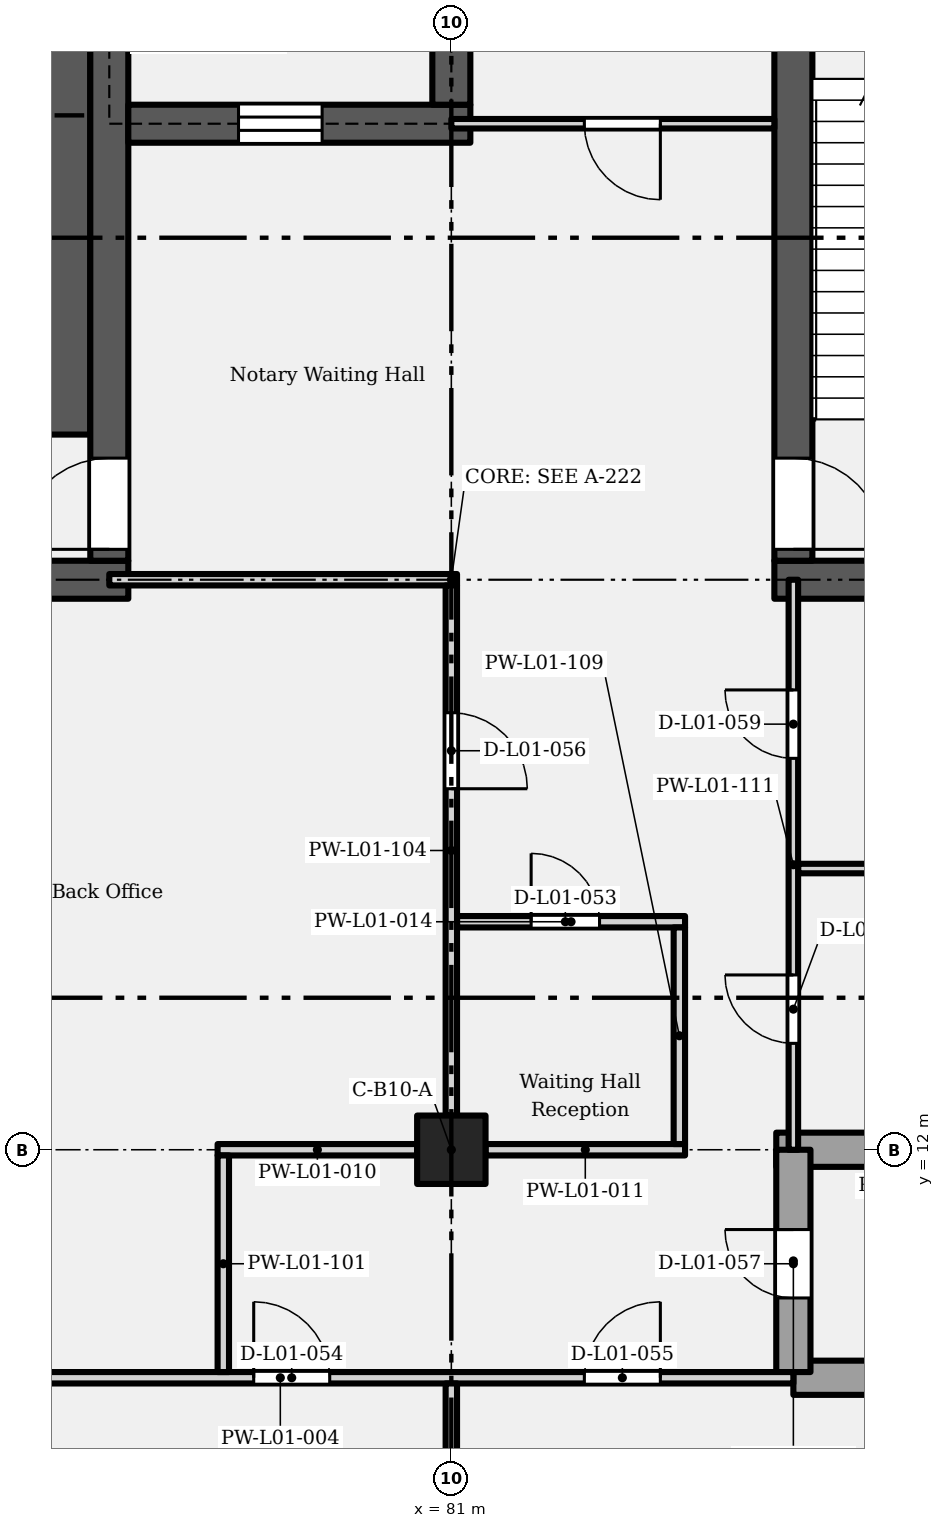
"""IFC4 building model, lengths in metres.
Left out: names, types, materials, properties, quantities, classifications, styles, units other than length and angle.
Written with IfcOpenShell. Run it as: python <this file> out.ifc"""

import sys

from ifc_helpers import new_model, si_unit, direction, frame, frame_2d, origin, origin_2d, place, context, subcontext, project, spatial, rectangle, extrude, element, fill, save


model = new_model("IFC4")
c1 = context("Model", 3, precision=1e-05, world=origin(), true_north=direction((0.0, 1.0)))
c2 = subcontext(c1, "Body", "Model", "MODEL_VIEW")
j1 = project(units=[si_unit("LENGTHUNIT", "METRE"), si_unit("PLANEANGLEUNIT", "RADIAN")], contexts=[c1])
p1 = place(None, origin())
s1 = spatial("IfcSite", under=j1, at=p1, CompositionType="ELEMENT")
p2 = place(p1, origin())
s2 = spatial("IfcBuilding", under=s1, at=p2, CompositionType="ELEMENT")
p3 = place(p2, frame((0.0, 0.0, 6.6)))
s3 = spatial("IfcBuildingStorey", under=s2, at=p3, CompositionType="ELEMENT", Elevation=6.6)
p4 = place(p3, frame((81.0, 12.0, 0.0), z_axis=(0.0, 0.0, 1.0), x_axis=(1.0, 0.0, 0.0)))
e1 = element("IfcColumn", 1, at=p4, inside=s3, PredefinedType="COLUMN", context=c2, shape_type="SweptSolid", body=[
    extrude(rectangle(XDim=0.9, YDim=0.9, at=origin_2d()), origin(), (0.0, 0.0, 1.0), 5.202),
])
for number, where, z_axis, x_axis in (
    (2, (71.75, 19.5, 0.0), (0.0, 0.0, 1.0), (1.0, 0.0, 0.0)),
    (3, (85.25, 19.5, 0.0), (0.0, 0.0, 1.0), (1.0, 0.0, 0.0)),
):
    element("IfcWall", number, at=place(p3, frame(where, z_axis=z_axis, x_axis=x_axis)), inside=s3, PredefinedType="SHEAR", context=c2, shape_type="SweptSolid", body=[
        extrude(rectangle(XDim=5.0, YDim=0.5, at=frame_2d((2.5, 0.0))), origin(), (0.0, 0.0, 1.0), 4.952),
    ])
p5 = place(p3, frame((76.5, 19.75, 0.0), z_axis=(0.0, 0.0, 1.0), x_axis=(0.0, 1.0, 0.0)))
e4 = element("IfcWall", 4, at=p5, inside=s3, PredefinedType="SHEAR", context=c2, shape_type="SweptSolid", body=[
    extrude(rectangle(XDim=8.5, YDim=0.5, at=frame_2d((4.25, 0.0))), origin(), (0.0, 0.0, 1.0), 4.952),
])
p6 = place(p5, frame((0.15, 0.0, 0.0)))
e5 = element("IfcOpeningElement", 5, at=p6, cuts=e4, PredefinedType="OPENING", context=c2, shape_type="SweptSolid", body=[
    extrude(rectangle(XDim=1.2, YDim=2.1, at=frame_2d((0.6, 1.05))), frame((0.0, 0.26, 0.0), z_axis=(0.0, -1.0, 0.0), x_axis=(1.0, 0.0, 0.0)), (0.0, 0.0, 1.0), 0.52),
])
p7 = place(p3, frame((85.5, 19.75, 0.0), z_axis=(0.0, 0.0, 1.0), x_axis=(0.0, 1.0, 0.0)))
e6 = element("IfcWall", 6, at=p7, inside=s3, PredefinedType="SHEAR", context=c2, shape_type="SweptSolid", body=[
    extrude(rectangle(XDim=8.5, YDim=0.5, at=frame_2d((4.25, 0.0))), origin(), (0.0, 0.0, 1.0), 4.952),
])
p8 = place(p7, frame((1.35, 0.0, 0.0), z_axis=(0.0, 0.0, 1.0), x_axis=(-1.0, 0.0, 0.0)))
e7 = element("IfcOpeningElement", 7, at=p8, cuts=e6, PredefinedType="OPENING", context=c2, shape_type="SweptSolid", body=[
    extrude(rectangle(XDim=1.2, YDim=2.1, at=frame_2d((0.6, 1.05))), frame((0.0, 0.26, 0.0), z_axis=(0.0, -1.0, 0.0), x_axis=(1.0, 0.0, 0.0)), (0.0, 0.0, 1.0), 0.52),
])
p9 = place(p3, frame((76.75, 25.5, 0.0), z_axis=(0.0, 0.0, 1.0), x_axis=(1.0, 0.0, 0.0)))
e8 = element("IfcWall", 8, at=p9, inside=s3, PredefinedType="SHEAR", context=c2, shape_type="SweptSolid", body=[
    extrude(rectangle(XDim=4.5, YDim=0.5, at=frame_2d((2.25, 0.0))), origin(), (0.0, 0.0, 1.0), 4.952),
])
p10 = place(p9, frame((1.45, 0.0, 0.0)))
e9 = element("IfcOpeningElement", 9, at=p10, cuts=e8, PredefinedType="OPENING", context=c2, shape_type="SweptSolid", body=[
    extrude(rectangle(XDim=1.1, YDim=2.1, at=frame_2d((0.55, 1.05))), frame((0.0, 0.26, 0.0), z_axis=(0.0, -1.0, 0.0), x_axis=(1.0, 0.0, 0.0)), (0.0, 0.0, 1.0), 0.52),
])
p11 = place(p3, frame((81.0, 25.75, 0.0), z_axis=(0.0, 0.0, 1.0), x_axis=(0.0, 1.0, 0.0)))
e10 = element("IfcWall", 10, at=p11, inside=s3, PredefinedType="SHEAR", context=c2, shape_type="SweptSolid", body=[
    extrude(rectangle(XDim=2.3, YDim=0.5, at=frame_2d((1.15, 0.0))), origin(), (0.0, 0.0, 1.0), 4.952),
])
p12 = place(p3, frame((76.36, 25.5, 5.202), z_axis=(0.0, 0.0, 1.0), x_axis=(1.0, 0.0, 0.0)))
e11 = element("IfcWall", 11, at=p12, inside=s3, PredefinedType="SOLIDWALL", context=c2, shape_type="SweptSolid", body=[
    extrude(rectangle(XDim=4.78, YDim=0.28, at=frame_2d((2.39, 0.0))), origin(), (0.0, 0.0, 1.0), 3.1),
])
p13 = place(p12, frame((1.84, 0.0, 0.198)))
e12 = element("IfcOpeningElement", 12, at=p13, cuts=e11, PredefinedType="OPENING", context=c2, shape_type="SweptSolid", body=[
    extrude(rectangle(XDim=1.1, YDim=2.1, at=frame_2d((0.55, 1.05))), frame((0.0, 0.15, 0.0), z_axis=(0.0, -1.0, 0.0), x_axis=(1.0, 0.0, 0.0)), (0.0, 0.0, 1.0), 0.3),
])
for number, where, z_axis, x_axis in (
    (13, (76.5, 25.64, 5.202), (0.0, 0.0, 1.0), (0.0, 1.0, 0.0)),
    (14, (81.0, 25.64, 5.202), (0.0, 0.0, 1.0), (0.0, 1.0, 0.0)),
):
    element("IfcWall", number, at=place(p3, frame(where, z_axis=z_axis, x_axis=x_axis)), inside=s3, PredefinedType="SOLIDWALL", context=c2, shape_type="SweptSolid", body=[
        extrude(rectangle(XDim=2.72, YDim=0.28, at=frame_2d((1.36, 0.0))), origin(), (0.0, 0.0, 1.0), 3.1),
    ])
p14 = place(p3, frame((71.43, 19.5, 5.202), z_axis=(0.0, 0.0, 1.0), x_axis=(1.0, 0.0, 0.0)))
e15 = element("IfcWall", 15, at=p14, inside=s3, PredefinedType="SOLIDWALL", context=c2, shape_type="SweptSolid", body=[
    extrude(rectangle(XDim=5.21, YDim=0.28, at=frame_2d((2.605, 0.0))), origin(), (0.0, 0.0, 1.0), 3.1),
])
p15 = place(p14, frame((2.055, 0.0, 2.4)))
e16 = element("IfcOpeningElement", 16, at=p15, cuts=e15, PredefinedType="OPENING", context=c2, shape_type="SweptSolid", body=[
    extrude(rectangle(XDim=1.1, YDim=0.6, at=frame_2d((0.55, 0.3))), frame((0.0, 0.15, 0.0), z_axis=(0.0, -1.0, 0.0), x_axis=(1.0, 0.0, 0.0)), (0.0, 0.0, 1.0), 0.3),
])
p16 = place(p3, frame((76.5, 19.64, 5.202), z_axis=(0.0, 0.0, 1.0), x_axis=(0.0, 1.0, 0.0)))
e17 = element("IfcWall", 17, at=p16, inside=s3, PredefinedType="SOLIDWALL", context=c2, shape_type="SweptSolid", body=[
    extrude(rectangle(XDim=5.72, YDim=0.28, at=frame_2d((2.86, 0.0))), origin(), (0.0, 0.0, 1.0), 3.1),
])
p17 = place(p16, frame((0.26, 0.0, 0.198)))
e18 = element("IfcOpeningElement", 18, at=p17, cuts=e17, PredefinedType="OPENING", context=c2, shape_type="SweptSolid", body=[
    extrude(rectangle(XDim=1.2, YDim=2.1, at=frame_2d((0.6, 1.05))), frame((0.0, 0.15, 0.0), z_axis=(0.0, -1.0, 0.0), x_axis=(1.0, 0.0, 0.0)), (0.0, 0.0, 1.0), 0.3),
])
p18 = place(p3, frame((85.36, 19.5, 5.202), z_axis=(0.0, 0.0, 1.0), x_axis=(1.0, 0.0, 0.0)))
e19 = element("IfcWall", 19, at=p18, inside=s3, PredefinedType="SOLIDWALL", context=c2, shape_type="SweptSolid", body=[
    extrude(rectangle(XDim=4.78, YDim=0.28, at=frame_2d((2.39, 0.0))), origin(), (0.0, 0.0, 1.0), 3.1),
])
p19 = place(p18, frame((1.84, 0.0, 2.4)))
e20 = element("IfcOpeningElement", 20, at=p19, cuts=e19, PredefinedType="OPENING", context=c2, shape_type="SweptSolid", body=[
    extrude(rectangle(XDim=1.1, YDim=0.6, at=frame_2d((0.55, 0.3))), frame((0.0, 0.15, 0.0), z_axis=(0.0, -1.0, 0.0), x_axis=(1.0, 0.0, 0.0)), (0.0, 0.0, 1.0), 0.3),
])
p20 = place(p3, frame((85.5, 19.64, 5.202), z_axis=(0.0, 0.0, 1.0), x_axis=(0.0, 1.0, 0.0)))
e21 = element("IfcWall", 21, at=p20, inside=s3, PredefinedType="SOLIDWALL", context=c2, shape_type="SweptSolid", body=[
    extrude(rectangle(XDim=8.72, YDim=0.28, at=frame_2d((4.36, 0.0))), origin(), (0.0, 0.0, 1.0), 3.1),
])
p21 = place(p20, frame((1.46, 0.0, 0.198), z_axis=(0.0, 0.0, 1.0), x_axis=(-1.0, 0.0, 0.0)))
e22 = element("IfcOpeningElement", 22, at=p21, cuts=e21, PredefinedType="OPENING", context=c2, shape_type="SweptSolid", body=[
    extrude(rectangle(XDim=1.2, YDim=2.1, at=frame_2d((0.6, 1.05))), frame((0.0, 0.15, 0.0), z_axis=(0.0, -1.0, 0.0), x_axis=(1.0, 0.0, 0.0)), (0.0, 0.0, 1.0), 0.3),
])
p22 = place(p3, frame((72.0, 9.0, 0.0), z_axis=(0.0, 0.0, 1.0), x_axis=(1.0, 0.0, 0.0)))
e23 = element("IfcWall", 23, at=p22, inside=s3, PredefinedType="PARTITIONING", context=c2, shape_type="SweptSolid", body=[
    extrude(rectangle(XDim=13.5, YDim=0.15, at=frame_2d((6.75, 0.0))), origin(), (0.0, 0.0, 1.0), 4.952),
])
p23 = place(p22, frame((6.4, 0.0, 0.0)))
e24 = element("IfcOpeningElement", 24, at=p23, cuts=e23, PredefinedType="OPENING", context=c2, shape_type="SweptSolid", body=[
    extrude(rectangle(XDim=1.0, YDim=2.1, at=frame_2d((0.5, 1.05))), frame((0.0, 0.085, 0.0), z_axis=(0.0, -1.0, 0.0), x_axis=(1.0, 0.0, 0.0)), (0.0, 0.0, 1.0), 0.17),
])
p24 = place(p22, frame((10.75, 0.0, 0.0)))
e25 = element("IfcOpeningElement", 25, at=p24, cuts=e23, PredefinedType="OPENING", context=c2, shape_type="SweptSolid", body=[
    extrude(rectangle(XDim=1.0, YDim=2.1, at=frame_2d((0.5, 1.05))), frame((0.0, 0.085, 0.0), z_axis=(0.0, -1.0, 0.0), x_axis=(1.0, 0.0, 0.0)), (0.0, 0.0, 1.0), 0.17),
])
p25 = place(p3, frame((85.5, 9.0, 0.0), z_axis=(0.0, 0.0, 1.0), x_axis=(1.0, 0.0, 0.0)))
e26 = element("IfcWall", 26, at=p25, inside=s3, PredefinedType="PARTITIONING", context=c2, shape_type="SweptSolid", body=[
    extrude(rectangle(XDim=4.5, YDim=0.45, at=frame_2d((2.25, 0.0))), origin(), (0.0, 0.0, 1.0), 4.952),
])
for number, where, z_axis, x_axis in (
    (27, (77.925, 12.0, 0.0), (0.0, 0.0, 1.0), (1.0, 0.0, 0.0)),
    (28, (81.45, 12.0, 0.0), (0.0, 0.0, 1.0), (1.0, 0.0, 0.0)),
):
    element("IfcWall", number, at=place(p3, frame(where, z_axis=z_axis, x_axis=x_axis)), inside=s3, PredefinedType="PARTITIONING", context=c2, shape_type="SweptSolid", body=[
        extrude(rectangle(XDim=2.625, YDim=0.15, at=frame_2d((1.312, 0.0))), origin(), (0.0, 0.0, 1.0), 4.202),
    ])
p26 = place(p3, frame((85.275, 12.0, 0.0), z_axis=(0.0, 0.0, 1.0), x_axis=(1.0, 0.0, 0.0)))
e29 = element("IfcWall", 29, at=p26, inside=s3, PredefinedType="PARTITIONING", context=c2, shape_type="SweptSolid", body=[
    extrude(rectangle(XDim=4.275, YDim=0.45, at=frame_2d((2.138, 0.0))), origin(), (0.0, 0.0, 1.0), 4.202),
])
p27 = place(p3, frame((81.075, 15.0, 0.0), z_axis=(0.0, 0.0, 1.0), x_axis=(1.0, 0.0, 0.0)))
e30 = element("IfcWall", 30, at=p27, inside=s3, PredefinedType="PARTITIONING", context=c2, shape_type="SweptSolid", body=[
    extrude(rectangle(XDim=3.0, YDim=0.15, at=frame_2d((1.5, 0.0))), origin(), (0.0, 0.0, 1.0), 4.952),
])
p28 = place(p27, frame((0.975, 0.0, 0.0)))
e31 = element("IfcOpeningElement", 31, at=p28, cuts=e30, PredefinedType="OPENING", context=c2, shape_type="SweptSolid", body=[
    extrude(rectangle(XDim=0.9, YDim=2.1, at=frame_2d((0.45, 1.05))), frame((0.0, 0.085, 0.0), z_axis=(0.0, -1.0, 0.0), x_axis=(1.0, 0.0, 0.0)), (0.0, 0.0, 1.0), 0.17),
])
p29 = place(p3, frame((85.562, 15.7, 0.0), z_axis=(0.0, 0.0, 1.0), x_axis=(1.0, 0.0, 0.0)))
e32 = element("IfcWall", 32, at=p29, inside=s3, PredefinedType="PARTITIONING", context=c2, shape_type="SweptSolid", body=[
    extrude(rectangle(XDim=4.688, YDim=0.125, at=frame_2d((2.344, 0.0))), origin(), (0.0, 0.0, 1.0), 4.952),
])
p30 = place(p3, frame((76.5, 19.5, 0.0), z_axis=(0.0, 0.0, 1.0), x_axis=(1.0, 0.0, 0.0)))
e33 = element("IfcWall", 33, at=p30, inside=s3, PredefinedType="PARTITIONING", context=c2, shape_type="SweptSolid", body=[
    extrude(rectangle(XDim=4.575, YDim=0.15, at=frame_2d((2.288, 0.0))), origin(), (0.0, 0.0, 1.0), 4.952),
])
p31 = place(p3, frame((81.0, 25.5, 0.0), z_axis=(0.0, 0.0, 1.0), x_axis=(1.0, 0.0, 0.0)))
e34 = element("IfcWall", 34, at=p31, inside=s3, PredefinedType="PARTITIONING", context=c2, shape_type="SweptSolid", body=[
    extrude(rectangle(XDim=4.25, YDim=0.125, at=frame_2d((2.125, 0.0))), origin(), (0.0, 0.0, 1.0), 4.952),
])
p32 = place(p31, frame((2.75, 0.0, 0.0), z_axis=(0.0, 0.0, 1.0), x_axis=(-1.0, 0.0, 0.0)))
e35 = element("IfcOpeningElement", 35, at=p32, cuts=e34, PredefinedType="OPENING", context=c2, shape_type="SweptSolid", body=[
    extrude(rectangle(XDim=1.0, YDim=2.1, at=frame_2d((0.5, 1.05))), frame((0.0, 0.073, 0.0), z_axis=(0.0, -1.0, 0.0), x_axis=(1.0, 0.0, 0.0)), (0.0, 0.0, 1.0), 0.145),
])
p33 = place(p3, frame((78.0, 9.075, 0.0), z_axis=(0.0, 0.0, 1.0), x_axis=(0.0, 1.0, 0.0)))
e36 = element("IfcWall", 36, at=p33, inside=s3, PredefinedType="PARTITIONING", context=c2, shape_type="SweptSolid", body=[
    extrude(rectangle(XDim=2.85, YDim=0.15, at=frame_2d((1.425, 0.0))), origin(), (0.0, 0.0, 1.0), 4.952),
])
p34 = place(p3, frame((81.0, 0.45, 0.0), z_axis=(0.0, 0.0, 1.0), x_axis=(0.0, 1.0, 0.0)))
e37 = element("IfcWall", 37, at=p34, inside=s3, PredefinedType="PARTITIONING", context=c2, shape_type="SweptSolid", body=[
    extrude(rectangle(XDim=8.475, YDim=0.15, at=frame_2d((4.238, 0.0))), origin(), (0.0, 0.0, 1.0), 4.202),
])
p35 = place(p3, frame((81.0, 12.45, 0.0), z_axis=(0.0, 0.0, 1.0), x_axis=(0.0, 1.0, 0.0)))
e38 = element("IfcWall", 38, at=p35, inside=s3, PredefinedType="PARTITIONING", context=c2, shape_type="SweptSolid", body=[
    extrude(rectangle(XDim=6.975, YDim=0.15, at=frame_2d((3.488, 0.0))), origin(), (0.0, 0.0, 1.0), 4.002),
])
p36 = place(p35, frame((5.3, 0.0, 0.0), z_axis=(0.0, 0.0, 1.0), x_axis=(-1.0, 0.0, 0.0)))
e39 = element("IfcOpeningElement", 39, at=p36, cuts=e38, PredefinedType="OPENING", context=c2, shape_type="SweptSolid", body=[
    extrude(rectangle(XDim=1.0, YDim=2.1, at=frame_2d((0.5, 1.05))), frame((0.0, 0.085, 0.0), z_axis=(0.0, -1.0, 0.0), x_axis=(1.0, 0.0, 0.0)), (0.0, 0.0, 1.0), 0.17),
])
p37 = place(p3, frame((84.0, 12.075, 0.0), z_axis=(0.0, 0.0, 1.0), x_axis=(0.0, 1.0, 0.0)))
e40 = element("IfcWall", 40, at=p37, inside=s3, PredefinedType="PARTITIONING", context=c2, shape_type="SweptSolid", body=[
    extrude(rectangle(XDim=2.85, YDim=0.15, at=frame_2d((1.425, 0.0))), origin(), (0.0, 0.0, 1.0), 4.952),
])
p38 = place(p3, frame((85.5, 9.075, 0.0), z_axis=(0.0, 0.0, 1.0), x_axis=(0.0, 1.0, 0.0)))
e41 = element("IfcWall", 41, at=p38, inside=s3, PredefinedType="PARTITIONING", context=c2, shape_type="SweptSolid", body=[
    extrude(rectangle(XDim=2.925, YDim=0.45, at=frame_2d((1.462, 0.0))), origin(), (0.0, 0.0, 1.0), 4.952),
])
p39 = place(p38, frame((0.975, 0.0, 0.0)))
e42 = element("IfcOpeningElement", 42, at=p39, cuts=e41, PredefinedType="OPENING", context=c2, shape_type="SweptSolid", body=[
    extrude(rectangle(XDim=0.9, YDim=2.1, at=frame_2d((0.45, 1.05))), frame((0.0, 0.235, 0.0), z_axis=(0.0, -1.0, 0.0), x_axis=(1.0, 0.0, 0.0)), (0.0, 0.0, 1.0), 0.47),
])
p40 = place(p3, frame((85.5, 12.0, 0.0), z_axis=(0.0, 0.0, 1.0), x_axis=(0.0, 1.0, 0.0)))
e43 = element("IfcWall", 43, at=p40, inside=s3, PredefinedType="PARTITIONING", context=c2, shape_type="SweptSolid", body=[
    extrude(rectangle(XDim=7.5, YDim=0.125, at=frame_2d((3.75, 0.0))), origin(), (0.0, 0.0, 1.0), 4.952),
])
p41 = place(p40, frame((1.4, 0.0, 0.0)))
e44 = element("IfcOpeningElement", 44, at=p41, cuts=e43, PredefinedType="OPENING", context=c2, shape_type="SweptSolid", body=[
    extrude(rectangle(XDim=0.9, YDim=2.1, at=frame_2d((0.45, 1.05))), frame((0.0, 0.073, 0.0), z_axis=(0.0, -1.0, 0.0), x_axis=(1.0, 0.0, 0.0)), (0.0, 0.0, 1.0), 0.145),
])
p42 = place(p40, frame((5.15, 0.0, 0.0)))
e45 = element("IfcOpeningElement", 45, at=p42, cuts=e43, PredefinedType="OPENING", context=c2, shape_type="SweptSolid", body=[
    extrude(rectangle(XDim=0.9, YDim=2.1, at=frame_2d((0.45, 1.05))), frame((0.0, 0.073, 0.0), z_axis=(0.0, -1.0, 0.0), x_axis=(1.0, 0.0, 0.0)), (0.0, 0.0, 1.0), 0.145),
])
p43 = place(p3, frame((75.9, 21.41, 0.0), z_axis=(0.0, 0.0, 1.0), x_axis=(0.0, 1.0, 0.0)))
e46 = element("IfcWall", 46, at=p43, inside=s3, PredefinedType="SHEAR", context=c2, shape_type="SweptSolid", body=[
    extrude(rectangle(XDim=6.64, YDim=0.7, at=frame_2d((3.32, 0.0))), origin(), (0.0, 0.0, 1.0), 2.587),
])
p44 = place(p28, origin())
e47 = element("IfcDoor", 47, at=p44, inside=s3, OperationType="SINGLE_SWING_LEFT", PredefinedType="DOOR", context=c2, shape_type="SweptSolid", body=[
    extrude(rectangle(XDim=0.9, YDim=2.1, at=frame_2d((0.45, 1.05))), frame((0.0, 0.025, 0.0), z_axis=(0.0, -1.0, 0.0), x_axis=(1.0, 0.0, 0.0)), (0.0, 0.0, 1.0), 0.05),
])
fill(e31, e47)
p45 = place(p23, origin())
e48 = element("IfcDoor", 48, at=p45, inside=s3, OperationType="SINGLE_SWING_LEFT", PredefinedType="DOOR", context=c2, shape_type="SweptSolid", body=[
    extrude(rectangle(XDim=1.0, YDim=2.1, at=frame_2d((0.5, 1.05))), frame((0.0, 0.025, 0.0), z_axis=(0.0, -1.0, 0.0), x_axis=(1.0, 0.0, 0.0)), (0.0, 0.0, 1.0), 0.05),
])
fill(e24, e48)
p46 = place(p24, origin())
e49 = element("IfcDoor", 49, at=p46, inside=s3, OperationType="SINGLE_SWING_RIGHT", PredefinedType="DOOR", context=c2, shape_type="SweptSolid", body=[
    extrude(rectangle(XDim=1.0, YDim=2.1, at=frame_2d((0.5, 1.05))), frame((0.0, 0.025, 0.0), z_axis=(0.0, -1.0, 0.0), x_axis=(1.0, 0.0, 0.0)), (0.0, 0.0, 1.0), 0.05),
])
fill(e25, e49)
p47 = place(p36, origin())
e50 = element("IfcDoor", 50, at=p47, inside=s3, OperationType="SINGLE_SWING_RIGHT", PredefinedType="DOOR", context=c2, shape_type="SweptSolid", body=[
    extrude(rectangle(XDim=1.0, YDim=2.1, at=frame_2d((0.5, 1.05))), frame((0.0, 0.025, 0.0), z_axis=(0.0, -1.0, 0.0), x_axis=(1.0, 0.0, 0.0)), (0.0, 0.0, 1.0), 0.05),
])
fill(e39, e50)
p48 = place(p39, origin())
e51 = element("IfcDoor", 51, at=p48, inside=s3, OperationType="SINGLE_SWING_RIGHT", PredefinedType="DOOR", context=c2, shape_type="SweptSolid", body=[
    extrude(rectangle(XDim=0.9, YDim=2.1, at=frame_2d((0.45, 1.05))), frame((0.0, 0.025, 0.0), z_axis=(0.0, -1.0, 0.0), x_axis=(1.0, 0.0, 0.0)), (0.0, 0.0, 1.0), 0.05),
])
fill(e42, e51)
p49 = place(p41, origin())
e52 = element("IfcDoor", 52, at=p49, inside=s3, OperationType="SINGLE_SWING_RIGHT", PredefinedType="DOOR", context=c2, shape_type="SweptSolid", body=[
    extrude(rectangle(XDim=0.9, YDim=2.1, at=frame_2d((0.45, 1.05))), frame((0.0, 0.025, 0.0), z_axis=(0.0, -1.0, 0.0), x_axis=(1.0, 0.0, 0.0)), (0.0, 0.0, 1.0), 0.05),
])
fill(e44, e52)
p50 = place(p42, origin())
e53 = element("IfcDoor", 53, at=p50, inside=s3, OperationType="SINGLE_SWING_RIGHT", PredefinedType="DOOR", context=c2, shape_type="SweptSolid", body=[
    extrude(rectangle(XDim=0.9, YDim=2.1, at=frame_2d((0.45, 1.05))), frame((0.0, 0.025, 0.0), z_axis=(0.0, -1.0, 0.0), x_axis=(1.0, 0.0, 0.0)), (0.0, 0.0, 1.0), 0.05),
])
fill(e45, e53)
p51 = place(p32, origin())
e54 = element("IfcDoor", 54, at=p51, inside=s3, OperationType="SINGLE_SWING_LEFT", PredefinedType="DOOR", context=c2, shape_type="SweptSolid", body=[
    extrude(rectangle(XDim=1.0, YDim=2.1, at=frame_2d((0.5, 1.05))), frame((0.0, 0.025, 0.0), z_axis=(0.0, -1.0, 0.0), x_axis=(1.0, 0.0, 0.0)), (0.0, 0.0, 1.0), 0.05),
])
fill(e35, e54)
p52 = place(p10, origin())
e55 = element("IfcDoor", 55, at=p52, inside=s3, OperationType="SLIDING_TO_LEFT", PredefinedType="DOOR", context=c2, shape_type="SweptSolid", body=[
    extrude(rectangle(XDim=1.1, YDim=2.1, at=frame_2d((0.55, 1.05))), frame((0.0, 0.025, 0.0), z_axis=(0.0, -1.0, 0.0), x_axis=(1.0, 0.0, 0.0)), (0.0, 0.0, 1.0), 0.05),
])
fill(e9, e55)
p53 = place(p6, origin())
e56 = element("IfcDoor", 56, at=p53, inside=s3, OperationType="SINGLE_SWING_LEFT", PredefinedType="DOOR", context=c2, shape_type="SweptSolid", body=[
    extrude(rectangle(XDim=1.2, YDim=2.1, at=frame_2d((0.6, 1.05))), frame((0.0, 0.025, 0.0), z_axis=(0.0, -1.0, 0.0), x_axis=(1.0, 0.0, 0.0)), (0.0, 0.0, 1.0), 0.05),
])
fill(e5, e56)
p54 = place(p8, origin())
e57 = element("IfcDoor", 57, at=p54, inside=s3, OperationType="SINGLE_SWING_RIGHT", PredefinedType="DOOR", context=c2, shape_type="SweptSolid", body=[
    extrude(rectangle(XDim=1.2, YDim=2.1, at=frame_2d((0.6, 1.05))), frame((0.0, 0.025, 0.0), z_axis=(0.0, -1.0, 0.0), x_axis=(1.0, 0.0, 0.0)), (0.0, 0.0, 1.0), 0.05),
])
fill(e7, e57)
save(model, sys.argv[1])
